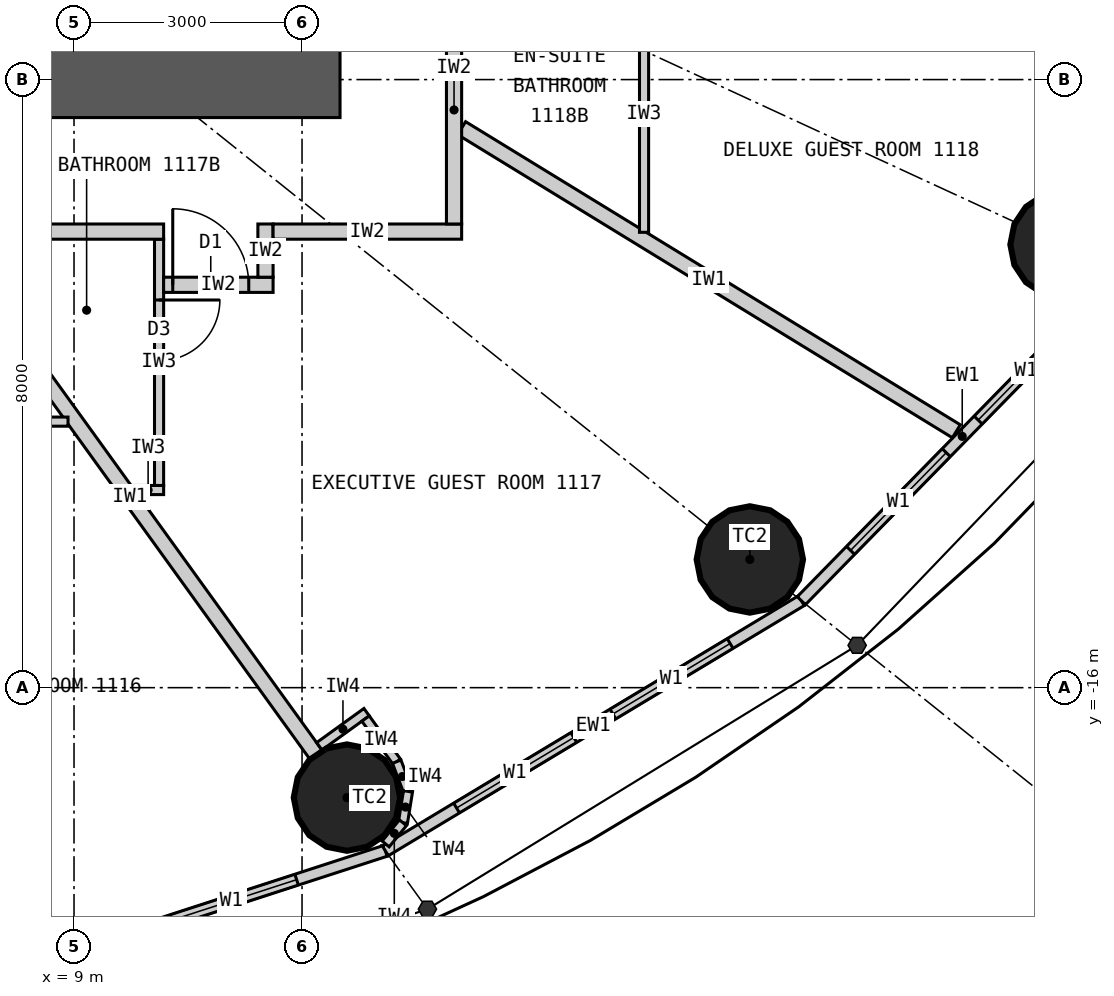
"""IFC4 building model, lengths in metres.
Left out: names, types, materials, properties, quantities, classifications, styles, units other than length and angle.
Written with IfcOpenShell. Run it as: python <this file> out.ifc"""

import sys

from ifc_helpers import new_model, si_unit, direction, frame, frame_2d, origin, origin_2d, place, context, subcontext, project, spatial, rectangle, circle, extrude, element, fill, save


model = new_model("IFC4")
c1 = context("Model", 3, precision=1e-05, world=origin(), true_north=direction((0.0, 1.0)))
c2 = subcontext(c1, "Body", "Model", "MODEL_VIEW")
j1 = project(units=[si_unit("LENGTHUNIT", "METRE"), si_unit("PLANEANGLEUNIT", "RADIAN")], contexts=[c1])
p1 = place(None, origin())
s1 = spatial("IfcSite", under=j1, at=p1, CompositionType="ELEMENT")
p2 = place(p1, origin())
s2 = spatial("IfcBuilding", under=s1, at=p2, CompositionType="ELEMENT")
p3 = place(p2, frame((0.0, 0.0, 50.7)))
s3 = spatial("IfcBuildingStorey", under=s2, at=p3, CompositionType="ELEMENT", Elevation=50.7)
for number, where, z_axis, x_axis in (
    (1, (12.591, -17.447, 0.0), (0.0, 0.0, 1.0), (1.0, 0.0, 0.0)),
    (2, (17.892, -14.313, 0.0), (0.0, 0.0, 1.0), (1.0, 0.0, 0.0)),
    (3, (22.019, -10.17, 0.0), (0.0, 0.0, 1.0), (1.0, 0.0, 0.0)),
):
    element("IfcColumn", number, at=place(p3, frame(where, z_axis=z_axis, x_axis=x_axis)), inside=s3, PredefinedType="COLUMN", context=c2, shape_type="SweptSolid", body=[
        extrude(circle(Radius=0.7, at=origin_2d()), origin(), (0.0, 0.0, 1.0), 3.3),
    ])
p4 = place(p3, frame((12.5, -8.0, 0.0), z_axis=(0.0, 0.0, 1.0), x_axis=(-1.0, 0.0, 0.0)))
e4 = element("IfcWall", 4, at=p4, inside=s3, PredefinedType="SHEAR", context=c2, shape_type="SweptSolid", body=[
    extrude(rectangle(XDim=25.0, YDim=1.0, at=frame_2d((12.5, 0.0))), origin(), (0.0, 0.0, 1.0), 3.3),
])
p5 = place(p4, frame((11.2, 0.0, 0.0)))
e5 = element("IfcOpeningElement", 5, at=p5, cuts=e4, PredefinedType="OPENING", context=c2, shape_type="SweptSolid", body=[
    extrude(rectangle(XDim=1.2, YDim=2.2, at=frame_2d((0.6, 1.1))), frame((0.0, 0.51, 0.0), z_axis=(0.0, -1.0, 0.0), x_axis=(1.0, 0.0, 0.0)), (0.0, 0.0, 1.0), 1.02),
])
p6 = place(p4, frame((18.8, 0.0, 0.0)))
e6 = element("IfcOpeningElement", 6, at=p6, cuts=e4, PredefinedType="OPENING", context=c2, shape_type="SweptSolid", body=[
    extrude(rectangle(XDim=0.9, YDim=2.2, at=frame_2d((0.45, 1.1))), frame((0.0, 0.51, 0.0), z_axis=(0.0, -1.0, 0.0), x_axis=(1.0, 0.0, 0.0)), (0.0, 0.0, 1.0), 1.02),
])
p7 = place(p3, frame((6.766, -20.202, 0.0), z_axis=(0.0, 0.0, 1.0), x_axis=(0.951137534625, 0.308767534285, 0.0)))
e7 = element("IfcWall", 7, at=p7, inside=s3, PredefinedType="ELEMENTEDWALL", context=c2, shape_type="SweptSolid", body=[
    extrude(rectangle(XDim=6.655, YDim=0.15, at=frame_2d((3.328, 0.0))), origin(), (0.0, 0.0, 1.0), 3.12),
])
p8 = place(p7, frame((1.228, 0.0, 0.9)))
e8 = element("IfcOpeningElement", 8, at=p8, cuts=e7, PredefinedType="OPENING", context=c2, shape_type="SweptSolid", body=[
    extrude(rectangle(XDim=1.8, YDim=1.9, at=frame_2d((0.9, 0.95))), frame((0.0, 0.085, 0.0), z_axis=(0.0, -1.0, 0.0), x_axis=(1.0, 0.0, 0.0)), (0.0, 0.0, 1.0), 0.17),
])
p9 = place(p7, frame((3.628, 0.0, 0.9)))
e9 = element("IfcOpeningElement", 9, at=p9, cuts=e7, PredefinedType="OPENING", context=c2, shape_type="SweptSolid", body=[
    extrude(rectangle(XDim=1.8, YDim=1.9, at=frame_2d((0.9, 0.95))), frame((0.0, 0.085, 0.0), z_axis=(0.0, -1.0, 0.0), x_axis=(1.0, 0.0, 0.0)), (0.0, 0.0, 1.0), 0.17),
])
p10 = place(p3, frame((13.096, -18.147, 0.0), z_axis=(0.0, 0.0, 1.0), x_axis=(0.856983180864, 0.515344377787, 0.0)))
e10 = element("IfcWall", 10, at=p10, inside=s3, PredefinedType="ELEMENTEDWALL", context=c2, shape_type="SweptSolid", body=[
    extrude(rectangle(XDim=6.386, YDim=0.15, at=frame_2d((3.193, 0.0))), origin(), (0.0, 0.0, 1.0), 3.12),
])
p11 = place(p10, frame((1.093, 0.0, 0.9)))
e11 = element("IfcOpeningElement", 11, at=p11, cuts=e10, PredefinedType="OPENING", context=c2, shape_type="SweptSolid", body=[
    extrude(rectangle(XDim=1.8, YDim=1.9, at=frame_2d((0.9, 0.95))), frame((0.0, 0.085, 0.0), z_axis=(0.0, -1.0, 0.0), x_axis=(1.0, 0.0, 0.0)), (0.0, 0.0, 1.0), 0.17),
])
p12 = place(p10, frame((3.493, 0.0, 0.9)))
e12 = element("IfcOpeningElement", 12, at=p12, cuts=e10, PredefinedType="OPENING", context=c2, shape_type="SweptSolid", body=[
    extrude(rectangle(XDim=1.8, YDim=1.9, at=frame_2d((0.9, 0.95))), frame((0.0, 0.085, 0.0), z_axis=(0.0, -1.0, 0.0), x_axis=(1.0, 0.0, 0.0)), (0.0, 0.0, 1.0), 0.17),
])
p13 = place(p3, frame((18.57, -14.856, 0.0), z_axis=(0.0, 0.0, 1.0), x_axis=(0.699602905915, 0.714531856557, 0.0)))
e13 = element("IfcWall", 13, at=p13, inside=s3, PredefinedType="ELEMENTEDWALL", context=c2, shape_type="SweptSolid", body=[
    extrude(rectangle(XDim=6.051, YDim=0.15, at=frame_2d((3.025, 0.0))), origin(), (0.0, 0.0, 1.0), 3.12),
])
p14 = place(p13, frame((0.926, 0.0, 0.9)))
e14 = element("IfcOpeningElement", 14, at=p14, cuts=e13, PredefinedType="OPENING", context=c2, shape_type="SweptSolid", body=[
    extrude(rectangle(XDim=1.8, YDim=1.9, at=frame_2d((0.9, 0.95))), frame((0.0, 0.085, 0.0), z_axis=(0.0, -1.0, 0.0), x_axis=(1.0, 0.0, 0.0)), (0.0, 0.0, 1.0), 0.17),
])
p15 = place(p13, frame((3.325, 0.0, 0.9)))
e15 = element("IfcOpeningElement", 15, at=p15, cuts=e13, PredefinedType="OPENING", context=c2, shape_type="SweptSolid", body=[
    extrude(rectangle(XDim=1.8, YDim=1.9, at=frame_2d((0.9, 0.95))), frame((0.0, 0.085, 0.0), z_axis=(0.0, -1.0, 0.0), x_axis=(1.0, 0.0, 0.0)), (0.0, 0.0, 1.0), 0.17),
])
p16 = place(p3, frame((7.289, -10.1, 0.0), z_axis=(0.0, 0.0, 1.0), x_axis=(0.585198353053, -0.810890182197, 0.0)))
e16 = element("IfcWall", 16, at=p16, inside=s3, PredefinedType="PARTITIONING", context=c2, shape_type="SweptSolid", body=[
    extrude(rectangle(XDim=8.36, YDim=0.2, at=frame_2d((4.18, 0.0))), origin(), (0.0, 0.0, 1.0), 2.32),
])
p17 = place(p3, frame((14.1, -8.639, 0.0), z_axis=(0.0, 0.0, 1.0), x_axis=(0.852672493023, -0.522445805459, 0.0)))
e17 = element("IfcWall", 17, at=p17, inside=s3, PredefinedType="PARTITIONING", context=c2, shape_type="SweptSolid", body=[
    extrude(rectangle(XDim=7.633, YDim=0.2, at=frame_2d((3.817, 0.0))), origin(), (0.0, 0.0, 1.0), 3.12),
])
p18 = place(p3, frame((14.1, -4.663, 0.0), z_axis=(0.0, 0.0, 1.0), x_axis=(0.949432655039, -0.31397075269, 0.0)))
e18 = element("IfcWall", 18, at=p18, inside=s3, PredefinedType="PARTITIONING", context=c2, shape_type="SweptSolid", body=[
    extrude(rectangle(XDim=10.486, YDim=0.2, at=frame_2d((5.243, 0.0))), origin(), (0.0, 0.0, 1.0), 3.12),
])
p19 = place(p3, frame((8.921, -12.5, 0.0), z_axis=(0.0, 0.0, 1.0), x_axis=(-1.0, 0.0, 0.0)))
e19 = element("IfcWall", 19, at=p19, inside=s3, PredefinedType="PARTITIONING", context=c2, shape_type="SweptSolid", body=[
    extrude(rectangle(XDim=3.372, YDim=0.12, at=frame_2d((1.686, 0.0))), origin(), (0.0, 0.0, 1.0), 3.12),
])
p20 = place(p3, frame((9.771, -13.4, 0.0), z_axis=(0.0, 0.0, 1.0), x_axis=(1.0, 0.0, 0.0)))
e20 = element("IfcWall", 20, at=p20, inside=s3, PredefinedType="PARTITIONING", context=c2, shape_type="SweptSolid", body=[
    extrude(rectangle(XDim=0.408, YDim=0.12, at=frame_2d((0.204, 0.0))), origin(), (0.0, 0.0, 1.0), 3.12),
])
p21 = place(p3, frame((10.119, -10.1, 0.0), z_axis=(0.0, 0.0, 1.0), x_axis=(0.0, -1.0, 0.0)))
e21 = element("IfcWall", 21, at=p21, inside=s3, PredefinedType="PARTITIONING", context=c2, shape_type="SweptSolid", body=[
    extrude(rectangle(XDim=3.24, YDim=0.12, at=frame_2d((1.62, 0.0))), origin(), (0.0, 0.0, 1.0), 3.12),
])
p22 = place(p21, frame((0.8, 0.0, 0.0)))
e22 = element("IfcOpeningElement", 22, at=p22, cuts=e21, PredefinedType="OPENING", context=c2, shape_type="SweptSolid", body=[
    extrude(rectangle(XDim=0.8, YDim=2.1, at=frame_2d((0.4, 1.05))), frame((0.0, 0.07, 0.0), z_axis=(0.0, -1.0, 0.0), x_axis=(1.0, 0.0, 0.0)), (0.0, 0.0, 1.0), 0.14),
])
p23 = place(p3, frame((16.5, -10.01, 0.0), z_axis=(0.0, 0.0, 1.0), x_axis=(0.0, 1.0, 0.0)))
e23 = element("IfcWall", 23, at=p23, inside=s3, PredefinedType="PARTITIONING", context=c2, shape_type="SweptSolid", body=[
    extrude(rectangle(XDim=3.111, YDim=0.12, at=frame_2d((1.555, 0.0))), origin(), (0.0, 0.0, 1.0), 3.12),
])
p24 = place(p3, frame((11.619, -10.7, 0.0), z_axis=(0.0, 0.0, 1.0), x_axis=(-1.0, 0.0, 0.0)))
e24 = element("IfcWall", 24, at=p24, inside=s3, PredefinedType="PARTITIONING", context=c2, shape_type="SweptSolid", body=[
    extrude(rectangle(XDim=1.44, YDim=0.2, at=frame_2d((0.72, 0.0))), origin(), (0.0, 0.0, 1.0), 3.12),
])
p25 = place(p24, frame((0.32, 0.0, 0.0)))
e25 = element("IfcOpeningElement", 25, at=p25, cuts=e24, PredefinedType="OPENING", context=c2, shape_type="SweptSolid", body=[
    extrude(rectangle(XDim=1.0, YDim=2.2, at=frame_2d((0.5, 1.1))), frame((0.0, 0.11, 0.0), z_axis=(0.0, -1.0, 0.0), x_axis=(1.0, 0.0, 0.0)), (0.0, 0.0, 1.0), 0.22),
])
p26 = place(p3, frame((11.519, -9.9, 0.0), z_axis=(0.0, 0.0, 1.0), x_axis=(0.0, -1.0, 0.0)))
e26 = element("IfcWall", 26, at=p26, inside=s3, PredefinedType="PARTITIONING", context=c2, shape_type="SweptSolid", body=[
    extrude(rectangle(XDim=0.7, YDim=0.2, at=frame_2d((0.35, 0.0))), origin(), (0.0, 0.0, 1.0), 3.12),
])
p27 = place(p3, frame((14.1, -10.0, 0.0), z_axis=(0.0, 0.0, 1.0), x_axis=(-1.0, 0.0, 0.0)))
e27 = element("IfcWall", 27, at=p27, inside=s3, PredefinedType="PARTITIONING", context=c2, shape_type="SweptSolid", body=[
    extrude(rectangle(XDim=2.481, YDim=0.2, at=frame_2d((1.24, 0.0))), origin(), (0.0, 0.0, 1.0), 3.12),
])
p28 = place(p3, frame((10.179, -10.0, 0.0), z_axis=(0.0, 0.0, 1.0), x_axis=(-1.0, 0.0, 0.0)))
e28 = element("IfcWall", 28, at=p28, inside=s3, PredefinedType="PARTITIONING", context=c2, shape_type="SweptSolid", body=[
    extrude(rectangle(XDim=4.63, YDim=0.2, at=frame_2d((2.315, 0.0))), origin(), (0.0, 0.0, 1.0), 3.12),
])
p29 = place(p3, frame((14.0, -9.9, 0.0), z_axis=(0.0, 0.0, 1.0), x_axis=(0.0, 1.0, 0.0)))
e29 = element("IfcWall", 29, at=p29, inside=s3, PredefinedType="PARTITIONING", context=c2, shape_type="SweptSolid", body=[
    extrude(rectangle(XDim=3.001, YDim=0.2, at=frame_2d((1.5, 0.0))), origin(), (0.0, 0.0, 1.0), 3.12),
])
p30 = place(p3, frame((12.227, -16.772, 0.0), z_axis=(0.0, 0.0, 1.0), x_axis=(0.810821798253, 0.585293098778, 0.0)))
e30 = element("IfcWall", 30, at=p30, inside=s3, PredefinedType="PARTITIONING", context=c2, shape_type="SweptSolid", body=[
    extrude(rectangle(XDim=0.768, YDim=0.12, at=frame_2d((0.384, 0.0))), origin(), (0.0, 0.0, 1.0), 3.12),
])
p31 = place(p3, frame((12.836, -16.406, 0.0), z_axis=(0.0, 0.0, 1.0), x_axis=(0.585223113993, -0.810872312296, 0.0)))
e31 = element("IfcWall", 31, at=p31, inside=s3, PredefinedType="PARTITIONING", context=c2, shape_type="SweptSolid", body=[
    extrude(rectangle(XDim=0.7, YDim=0.12, at=frame_2d((0.35, 0.0))), origin(), (0.0, 0.0, 1.0), 3.12),
])
p32 = place(p3, frame((13.246, -16.974, 0.0), z_axis=(0.0, 0.0, 1.0), x_axis=(0.355728122235, -0.934589483705, 0.0)))
e32 = element("IfcWall", 32, at=p32, inside=s3, PredefinedType="PARTITIONING", context=c2, shape_type="SweptSolid", body=[
    extrude(rectangle(XDim=0.418, YDim=0.12, at=frame_2d((0.209, 0.0))), origin(), (0.0, 0.0, 1.0), 3.12),
])
p33 = place(p3, frame((13.394, -17.365, 0.0), z_axis=(0.0, 0.0, 1.0), x_axis=(-0.159379276926, -0.987217425943, 0.0)))
e33 = element("IfcWall", 33, at=p33, inside=s3, PredefinedType="PARTITIONING", context=c2, shape_type="SweptSolid", body=[
    extrude(rectangle(XDim=0.418, YDim=0.12, at=frame_2d((0.209, 0.0))), origin(), (0.0, 0.0, 1.0), 3.12),
])
p34 = place(p3, frame((13.328, -17.777, 0.0), z_axis=(0.0, 0.0, 1.0), x_axis=(-0.632276783541, -0.774742582407, 0.0)))
e34 = element("IfcWall", 34, at=p34, inside=s3, PredefinedType="PARTITIONING", context=c2, shape_type="SweptSolid", body=[
    extrude(rectangle(XDim=0.36, YDim=0.12, at=frame_2d((0.18, 0.0))), origin(), (0.0, 0.0, 1.0), 3.12),
])
p35 = place(p9, origin())
e35 = element("IfcWindow", 35, at=p35, inside=s3, PartitioningType="SINGLE_PANEL", PredefinedType="WINDOW", context=c2, shape_type="SweptSolid", body=[
    extrude(rectangle(XDim=1.8, YDim=1.9, at=frame_2d((0.9, 0.95))), frame((0.0, 0.03, 0.0), z_axis=(0.0, -1.0, 0.0), x_axis=(1.0, 0.0, 0.0)), (0.0, 0.0, 1.0), 0.06),
])
fill(e9, e35)
p36 = place(p11, origin())
e36 = element("IfcWindow", 36, at=p36, inside=s3, PartitioningType="SINGLE_PANEL", PredefinedType="WINDOW", context=c2, shape_type="SweptSolid", body=[
    extrude(rectangle(XDim=1.8, YDim=1.9, at=frame_2d((0.9, 0.95))), frame((0.0, 0.03, 0.0), z_axis=(0.0, -1.0, 0.0), x_axis=(1.0, 0.0, 0.0)), (0.0, 0.0, 1.0), 0.06),
])
fill(e11, e36)
p37 = place(p12, origin())
e37 = element("IfcWindow", 37, at=p37, inside=s3, PartitioningType="SINGLE_PANEL", PredefinedType="WINDOW", context=c2, shape_type="SweptSolid", body=[
    extrude(rectangle(XDim=1.8, YDim=1.9, at=frame_2d((0.9, 0.95))), frame((0.0, 0.03, 0.0), z_axis=(0.0, -1.0, 0.0), x_axis=(1.0, 0.0, 0.0)), (0.0, 0.0, 1.0), 0.06),
])
fill(e12, e37)
p38 = place(p14, origin())
e38 = element("IfcWindow", 38, at=p38, inside=s3, PartitioningType="SINGLE_PANEL", PredefinedType="WINDOW", context=c2, shape_type="SweptSolid", body=[
    extrude(rectangle(XDim=1.8, YDim=1.9, at=frame_2d((0.9, 0.95))), frame((0.0, 0.03, 0.0), z_axis=(0.0, -1.0, 0.0), x_axis=(1.0, 0.0, 0.0)), (0.0, 0.0, 1.0), 0.06),
])
fill(e14, e38)
p39 = place(p15, origin())
e39 = element("IfcWindow", 39, at=p39, inside=s3, PartitioningType="SINGLE_PANEL", PredefinedType="WINDOW", context=c2, shape_type="SweptSolid", body=[
    extrude(rectangle(XDim=1.8, YDim=1.9, at=frame_2d((0.9, 0.95))), frame((0.0, 0.03, 0.0), z_axis=(0.0, -1.0, 0.0), x_axis=(1.0, 0.0, 0.0)), (0.0, 0.0, 1.0), 0.06),
])
fill(e15, e39)
p40 = place(p22, origin())
e40 = element("IfcDoor", 40, at=p40, inside=s3, OperationType="SINGLE_SWING_LEFT", PredefinedType="DOOR", context=c2, shape_type="SweptSolid", body=[
    extrude(rectangle(XDim=0.8, YDim=2.1, at=frame_2d((0.4, 1.05))), frame((0.0, 0.025, 0.0), z_axis=(0.0, -1.0, 0.0), x_axis=(1.0, 0.0, 0.0)), (0.0, 0.0, 1.0), 0.05),
])
fill(e22, e40)
p41 = place(p25, origin())
e41 = element("IfcDoor", 41, at=p41, inside=s3, OperationType="SINGLE_SWING_RIGHT", PredefinedType="DOOR", context=c2, shape_type="SweptSolid", body=[
    extrude(rectangle(XDim=1.0, YDim=2.2, at=frame_2d((0.5, 1.1))), frame((0.0, 0.025, 0.0), z_axis=(0.0, -1.0, 0.0), x_axis=(1.0, 0.0, 0.0)), (0.0, 0.0, 1.0), 0.05),
])
fill(e25, e41)
save(model, sys.argv[1])
